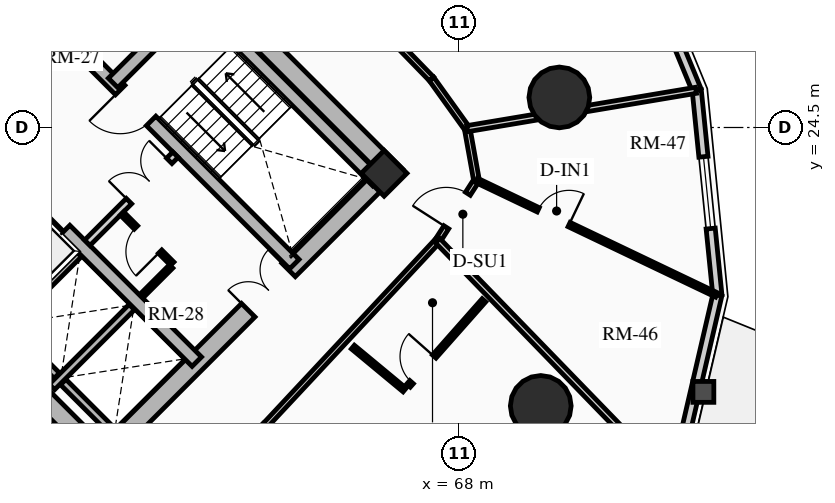
"""IFC4 building model, lengths in metres.
Left out: names, types, materials, properties, quantities, classifications, styles, units other than length and angle.
Written with IfcOpenShell. Run it as: python <this file> out.ifc"""

import sys

from ifc_helpers import new_model, si_unit, direction, frame, frame_2d, origin, origin_2d, place, context, subcontext, project, spatial, rectangle, circle, extrude, source, transform, mapped, element, fill, save


model = new_model("IFC4")
c1 = context("Model", 3, precision=1e-05, world=origin(), true_north=direction((0.0, 1.0)))
c2 = subcontext(c1, "Body", "Model", "MODEL_VIEW")
j1 = project(units=[si_unit("LENGTHUNIT", "METRE"), si_unit("PLANEANGLEUNIT", "RADIAN")], contexts=[c1])
p1 = place(None, origin())
s1 = spatial("IfcSite", under=j1, at=p1, CompositionType="ELEMENT")
p2 = place(p1, origin())
s2 = spatial("IfcBuilding", under=s1, at=p2, CompositionType="ELEMENT")
p3 = place(p2, frame((0.0, 0.0, 33.64)))
s3 = spatial("IfcBuildingStorey", under=s2, at=p3, CompositionType="ELEMENT", Elevation=33.64)
for number, where, z_axis, x_axis in (
    (1, (58.773, 15.661, 0.0), (0.0, 0.0, 1.0), (-0.707, 0.707, 0.0)),
    (2, (66.339, 23.227, 0.0), (0.0, 0.0, 1.0), (-0.707, 0.707, 0.0)),
):
    element("IfcWall", number, at=place(p3, frame(where, z_axis=z_axis, x_axis=x_axis)), inside=s3, PredefinedType="SHEAR", context=c2, shape_type="SweptSolid", body=[
        extrude(rectangle(XDim=14.3, YDim=0.5, at=frame_2d((7.15, 0.0))), origin(), (0.0, 0.0, 1.0), 2.91),
    ])
p4 = place(p3, frame((58.596, 15.838, 0.0), z_axis=(0.0, 0.0, 1.0), x_axis=(0.707106781187, 0.707106781187, 0.0)))
e3 = element("IfcWall", 3, at=p4, inside=s3, PredefinedType="SHEAR", context=c2, shape_type="SweptSolid", body=[
    extrude(rectangle(XDim=10.7, YDim=0.5, at=frame_2d((5.35, 0.0))), origin(), (0.0, 0.0, 1.0), 2.91),
])
m1 = source(origin(), c2, "Body", "SweptSolid", [
    extrude(rectangle(XDim=1.5, YDim=2.02, at=frame_2d((0.75, 1.01))), frame((0.0, 0.26, 0.0), z_axis=(0.0, -1.0, 0.0), x_axis=(1.0, 0.0, 0.0)), (0.0, 0.0, 1.0), 0.52),
])
p5 = place(p4, frame((5.45, 0.0, 0.0)))
e4 = element("IfcOpeningElement", 4, at=p5, cuts=e3, PredefinedType="OPENING", context=c2, shape_type="MappedRepresentation", body=[
    mapped(m1, transform((0.0, 0.0, 0.0), x_axis=(1.0, 0.0, 0.0), y_axis=(0.0, 1.0, 0.0), z_axis=(0.0, 0.0, 1.0), scale=1.0)),
])
p6 = place(p3, frame((61.096, 18.338, 0.0), z_axis=(0.0, 0.0, 1.0), x_axis=(-0.707106781187, 0.707106781187, 0.0)))
e5 = element("IfcWall", 5, at=p6, inside=s3, PredefinedType="SHEAR", context=c2, shape_type="SweptSolid", body=[
    extrude(rectangle(XDim=13.8, YDim=0.35, at=frame_2d((6.9, 0.0))), origin(), (0.0, 0.0, 1.0), 2.91),
])
m2 = source(origin(), c2, "Body", "SweptSolid", [
    extrude(rectangle(XDim=1.1, YDim=2.015, at=frame_2d((0.55, 1.007))), frame((0.0, 0.185, 0.0), z_axis=(0.0, -1.0, 0.0), x_axis=(1.0, 0.0, 0.0)), (0.0, 0.0, 1.0), 0.37),
])
p7 = place(p6, frame((4.9, 0.0, 0.0)))
e6 = element("IfcOpeningElement", 6, at=p7, cuts=e5, PredefinedType="OPENING", context=c2, shape_type="MappedRepresentation", body=[
    mapped(m2, transform((0.0, 0.0, 0.0), x_axis=(1.0, 0.0, 0.0), y_axis=(0.0, 1.0, 0.0), z_axis=(0.0, 0.0, 1.0), scale=1.0)),
])
m3 = source(origin(), c2, "Body", "SweptSolid", [
    extrude(rectangle(XDim=1.15, YDim=2.02, at=frame_2d((0.575, 1.01))), frame((0.0, 0.185, 0.0), z_axis=(0.0, -1.0, 0.0), x_axis=(1.0, 0.0, 0.0)), (0.0, 0.0, 1.0), 0.37),
])
p8 = place(p6, frame((7.32, 0.0, 0.0)))
e7 = element("IfcOpeningElement", 7, at=p8, cuts=e5, PredefinedType="OPENING", context=c2, shape_type="MappedRepresentation", body=[
    mapped(m3, transform((0.0, 0.0, 0.0), x_axis=(1.0, 0.0, 0.0), y_axis=(0.0, 1.0, 0.0), z_axis=(0.0, 0.0, 1.0), scale=1.0)),
])
p9 = place(p3, frame((63.662, 20.904, 0.0), z_axis=(0.0, 0.0, 1.0), x_axis=(-0.707106781187, 0.707106781187, 0.0)))
e8 = element("IfcWall", 8, at=p9, inside=s3, PredefinedType="SHEAR", context=c2, shape_type="SweptSolid", body=[
    extrude(rectangle(XDim=13.8, YDim=0.35, at=frame_2d((6.9, 0.0))), origin(), (0.0, 0.0, 1.0), 2.91),
])
p10 = place(p9, frame((10.025, 0.0, 0.0)))
e9 = element("IfcOpeningElement", 9, at=p10, cuts=e8, PredefinedType="OPENING", context=c2, shape_type="MappedRepresentation", body=[
    mapped(m2, transform((0.0, 0.0, 0.0), x_axis=(1.0, 0.0, 0.0), y_axis=(0.0, 1.0, 0.0), z_axis=(0.0, 0.0, 1.0), scale=1.0)),
])
p11 = place(p9, frame((12.025, 0.0, 0.0)))
e10 = element("IfcOpeningElement", 10, at=p11, cuts=e8, PredefinedType="OPENING", context=c2, shape_type="MappedRepresentation", body=[
    mapped(m2, transform((0.0, 0.0, 0.0), x_axis=(1.0, 0.0, 0.0), y_axis=(0.0, 1.0, 0.0), z_axis=(0.0, 0.0, 1.0), scale=1.0)),
])
p12 = place(p9, frame((5.33, 0.0, 0.0)))
e11 = element("IfcOpeningElement", 11, at=p12, cuts=e8, PredefinedType="OPENING", context=c2, shape_type="MappedRepresentation", body=[
    mapped(m3, transform((0.0, 0.0, 0.0), x_axis=(1.0, 0.0, 0.0), y_axis=(0.0, 1.0, 0.0), z_axis=(0.0, 0.0, 1.0), scale=1.0)),
])
p13 = place(p3, frame((65.847, 23.089, 0.0), z_axis=(0.0, 0.0, 1.0), x_axis=(-0.707106781187, 0.707106781187, 0.0)))
e12 = element("IfcWall", 12, at=p13, inside=s3, PredefinedType="SHEAR", context=c2, shape_type="SweptSolid", body=[
    extrude(rectangle(XDim=6.745, YDim=0.35, at=frame_2d((3.373, 0.0))), origin(), (0.0, 0.0, 1.0), 2.91),
])
p14 = place(p3, frame((58.893, 25.674, 0.0), z_axis=(0.0, 0.0, 1.0), x_axis=(0.707106781187, 0.707106781187, 0.0)))
e13 = element("IfcWall", 13, at=p14, inside=s3, PredefinedType="SHEAR", context=c2, shape_type="SweptSolid", body=[
    extrude(rectangle(XDim=3.285, YDim=0.35, at=frame_2d((1.643, 0.0))), origin(), (0.0, 0.0, 1.0), 2.91),
])
p15 = place(p3, frame((66.024, 23.294, 0.0), z_axis=(0.0, 0.0, 1.0), x_axis=(0.707106781187, 0.707106781187, 0.0)))
e14 = element("IfcColumn", 14, at=p15, inside=s3, PredefinedType="COLUMN", context=c2, shape_type="SweptSolid", body=[
    extrude(rectangle(XDim=0.85, YDim=0.85, at=origin_2d()), origin(), (0.0, 0.0, 1.0), 2.91),
])
for number, where, z_axis, x_axis in (
    (15, (70.146, 17.173, 0.0), (0.0, 0.0, 1.0), (1.0, 0.0, 0.0)),
    (16, (70.635, 25.291, 0.0), (0.0, 0.0, 1.0), (1.0, 0.0, 0.0)),
):
    element("IfcColumn", number, at=place(p3, frame(where, z_axis=z_axis, x_axis=x_axis)), inside=s3, PredefinedType="USERDEFINED", context=c2, shape_type="SweptSolid", body=[
        extrude(circle(Radius=0.8, at=origin_2d()), origin(), (0.0, 0.0, 1.0), 2.91),
    ])
p16 = place(p3, frame((74.794, 20.09, 0.0), z_axis=(0.0, 0.0, 1.0), x_axis=(-0.22582585901, -0.974167686491, 0.0)))
e17 = element("IfcWall", 17, at=p16, inside=s3, PredefinedType="SOLIDWALL", context=c2, shape_type="SweptSolid", body=[
    extrude(rectangle(XDim=5.092, YDim=0.24, at=frame_2d((2.546, 0.0))), origin(), (0.0, 0.0, 1.0), 2.073),
])
p17 = place(p3, frame((74.251, 25.482, 0.0), z_axis=(0.0, 0.0, 1.0), x_axis=(0.100190592135, -0.994968263437, 0.0)))
e18 = element("IfcWall", 18, at=p17, inside=s3, PredefinedType="SOLIDWALL", context=c2, shape_type="SweptSolid", body=[
    extrude(rectangle(XDim=5.419, YDim=0.24, at=frame_2d((2.71, 0.0))), origin(), (0.0, 0.0, 1.0), 2.073),
])
m4 = source(origin(), c2, "Body", "SweptSolid", [
    extrude(rectangle(XDim=1.9, YDim=1.35, at=frame_2d((0.95, 0.675))), frame((0.0, 0.13, 0.0), z_axis=(0.0, -1.0, 0.0), x_axis=(1.0, 0.0, 0.0)), (0.0, 0.0, 1.0), 0.26),
])
p18 = place(p17, frame((1.76, 0.0, 0.65)))
e19 = element("IfcOpeningElement", 19, at=p18, cuts=e18, PredefinedType="OPENING", context=c2, shape_type="MappedRepresentation", body=[
    mapped(m4, transform((0.0, 0.0, 0.0), x_axis=(1.0, 0.0, 0.0), y_axis=(0.0, 1.0, 0.0), z_axis=(0.0, 0.0, 1.0), scale=1.0)),
])
p19 = place(p3, frame((72.068, 30.778, 0.0), z_axis=(0.0, 0.0, 1.0), x_axis=(0.381077764176, -0.924542988536, 0.0)))
e20 = element("IfcWall", 20, at=p19, inside=s3, PredefinedType="SOLIDWALL", context=c2, shape_type="SweptSolid", body=[
    extrude(rectangle(XDim=5.728, YDim=0.24, at=frame_2d((2.864, 0.0))), origin(), (0.0, 0.0, 1.0), 2.073),
])
p20 = place(p3, frame((55.888, 19.069, 0.0), z_axis=(0.0, 0.0, 1.0), x_axis=(0.707106781187, 0.707106781187, 0.0)))
e21 = element("IfcWall", 21, at=p20, inside=s3, PredefinedType="SHEAR", context=c2, shape_type="SweptSolid", body=[
    extrude(rectangle(XDim=2.97, YDim=0.2, at=frame_2d((1.485, 0.0))), origin(), (0.0, 0.0, 1.0), 2.91),
])
p21 = place(p3, frame((57.284, 17.673, 0.0), z_axis=(0.0, 0.0, 1.0), x_axis=(0.707147878904, 0.70706568108, 0.0)))
e22 = element("IfcWall", 22, at=p21, inside=s3, PredefinedType="SHEAR", context=c2, shape_type="SweptSolid", body=[
    extrude(rectangle(XDim=2.97, YDim=0.2, at=frame_2d((1.485, 0.0))), origin(), (0.0, 0.0, 1.0), 2.91),
])
p22 = place(p3, frame((57.412, 17.97, 0.0), z_axis=(0.0, 0.0, 1.0), x_axis=(-0.707106781187, 0.707106781187, 0.0)))
e23 = element("IfcWall", 23, at=p22, inside=s3, PredefinedType="SHEAR", context=c2, shape_type="SweptSolid", body=[
    extrude(rectangle(XDim=1.735, YDim=0.2, at=frame_2d((0.867, 0.0))), origin(), (0.0, 0.0, 1.0), 2.91),
])
p23 = place(p3, frame((58.737, 16.644, 0.0), z_axis=(0.0, 0.0, 1.0), x_axis=(-0.707032117043, 0.707181437447, 0.0)))
e24 = element("IfcWall", 24, at=p23, inside=s3, PredefinedType="SHEAR", context=c2, shape_type="SweptSolid", body=[
    extrude(rectangle(XDim=1.635, YDim=0.2, at=frame_2d((0.817, 0.0))), origin(), (0.0, 0.0, 1.0), 2.91),
])
p24 = place(p3, frame((58.214, 21.467, 0.0), z_axis=(0.0, 0.0, 1.0), x_axis=(0.707106781187, 0.707106781187, 0.0)))
e25 = element("IfcWall", 25, at=p24, inside=s3, PredefinedType="PARTITIONING", context=c2, shape_type="SweptSolid", body=[
    extrude(rectangle(XDim=3.28, YDim=0.2, at=frame_2d((1.64, 0.0))), origin(), (0.0, 0.0, 1.0), 2.635),
])
m5 = source(origin(), c2, "Body", "SweptSolid", [
    extrude(rectangle(XDim=1.5, YDim=2.02, at=frame_2d((0.75, 1.01))), frame((0.0, 0.11, 0.0), z_axis=(0.0, -1.0, 0.0), x_axis=(1.0, 0.0, 0.0)), (0.0, 0.0, 1.0), 0.22),
])
p25 = place(p24, frame((1.55, 0.0, 0.0)))
e26 = element("IfcOpeningElement", 26, at=p25, cuts=e25, PredefinedType="OPENING", context=c2, shape_type="MappedRepresentation", body=[
    mapped(m5, transform((0.0, 0.0, 0.0), x_axis=(1.0, 0.0, 0.0), y_axis=(0.0, 1.0, 0.0), z_axis=(0.0, 0.0, 1.0), scale=1.0)),
])
p26 = place(p3, frame((54.961, 24.719, 0.0), z_axis=(0.0, 0.0, 1.0), x_axis=(0.707106781187, 0.707106781187, 0.0)))
e27 = element("IfcWall", 27, at=p26, inside=s3, PredefinedType="PARTITIONING", context=c2, shape_type="SweptSolid", body=[
    extrude(rectangle(XDim=3.28, YDim=0.2, at=frame_2d((1.64, 0.0))), origin(), (0.0, 0.0, 1.0), 2.635),
])
m6 = source(origin(), c2, "Body", "SweptSolid", [
    extrude(rectangle(XDim=0.9, YDim=2.005, at=frame_2d((0.45, 1.002))), frame((0.0, 0.11, 0.0), z_axis=(0.0, -1.0, 0.0), x_axis=(1.0, 0.0, 0.0)), (0.0, 0.0, 1.0), 0.22),
])
p27 = place(p26, frame((0.16, 0.0, 0.0)))
e28 = element("IfcOpeningElement", 28, at=p27, cuts=e27, PredefinedType="OPENING", context=c2, shape_type="MappedRepresentation", body=[
    mapped(m6, transform((0.0, 0.0, 0.0), x_axis=(1.0, 0.0, 0.0), y_axis=(0.0, 1.0, 0.0), z_axis=(0.0, 0.0, 1.0), scale=1.0)),
])
p28 = place(p3, frame((60.448, 20.915, 0.0), z_axis=(0.0, 0.0, 1.0), x_axis=(-0.707106781187, 0.707106781187, 0.0)))
e29 = element("IfcWall", 29, at=p28, inside=s3, PredefinedType="PARTITIONING", context=c2, shape_type="SweptSolid", body=[
    extrude(rectangle(XDim=1.87, YDim=0.125, at=frame_2d((0.935, 0.0))), origin(), (0.0, 0.0, 1.0), 2.635),
])
m7 = source(origin(), c2, "Body", "SweptSolid", [
    extrude(rectangle(XDim=0.9, YDim=2.005, at=frame_2d((0.45, 1.002))), frame((0.0, 0.073, 0.0), z_axis=(0.0, -1.0, 0.0), x_axis=(1.0, 0.0, 0.0)), (0.0, 0.0, 1.0), 0.145),
])
p29 = place(p28, frame((0.45, 0.0, 0.0)))
e30 = element("IfcOpeningElement", 30, at=p29, cuts=e29, PredefinedType="OPENING", context=c2, shape_type="MappedRepresentation", body=[
    mapped(m7, transform((0.0, 0.0, 0.0), x_axis=(1.0, 0.0, 0.0), y_axis=(0.0, 1.0, 0.0), z_axis=(0.0, 0.0, 1.0), scale=1.0)),
])
p30 = place(p3, frame((59.643, 20.066, 0.0), z_axis=(0.0, 0.0, 1.0), x_axis=(0.707106781187, 0.707106781187, 0.0)))
e31 = element("IfcWall", 31, at=p30, inside=s3, PredefinedType="PARTITIONING", context=c2, shape_type="SweptSolid", body=[
    extrude(rectangle(XDim=1.1, YDim=0.125, at=frame_2d((0.55, 0.0))), origin(), (0.0, 0.0, 1.0), 2.635),
])
p31 = place(p3, frame((62.903, 16.667, 0.0), z_axis=(0.0, 0.0, 1.0), x_axis=(0.682371947497, 0.731005147225, 0.0)))
e32 = element("IfcWall", 32, at=p31, inside=s3, PredefinedType="PARTITIONING", context=c2, shape_type="SweptSolid", body=[
    extrude(rectangle(XDim=6.642, YDim=0.15, at=frame_2d((3.321, 0.0))), origin(), (0.0, 0.0, 1.0), 2.159),
])
p32 = place(p3, frame((67.435, 21.521, 0.0), z_axis=(0.0, 0.0, 1.0), x_axis=(0.540777197838, 0.841165870859, 0.0)))
e33 = element("IfcWall", 33, at=p32, inside=s3, PredefinedType="PARTITIONING", context=c2, shape_type="SweptSolid", body=[
    extrude(rectangle(XDim=1.888, YDim=0.15, at=frame_2d((0.944, 0.0))), origin(), (0.0, 0.0, 1.0), 2.205),
])
m8 = source(origin(), c2, "Body", "SweptSolid", [
    extrude(rectangle(XDim=1.05, YDim=2.015, at=frame_2d((0.525, 1.007))), frame((0.0, 0.085, 0.0), z_axis=(0.0, -1.0, 0.0), x_axis=(1.0, 0.0, 0.0)), (0.0, 0.0, 1.0), 0.17),
])
p33 = place(p32, frame((0.419, 0.0, 0.0)))
e34 = element("IfcOpeningElement", 34, at=p33, cuts=e33, PredefinedType="OPENING", context=c2, shape_type="MappedRepresentation", body=[
    mapped(m8, transform((0.0, 0.0, 0.0), x_axis=(1.0, 0.0, 0.0), y_axis=(0.0, 1.0, 0.0), z_axis=(0.0, 0.0, 1.0), scale=1.0)),
])
p34 = place(p3, frame((68.456, 23.11, 0.0), z_axis=(0.0, 0.0, 1.0), x_axis=(-0.1772522795, 0.984165448191, 0.0)))
e35 = element("IfcWall", 35, at=p34, inside=s3, PredefinedType="PARTITIONING", context=c2, shape_type="SweptSolid", body=[
    extrude(rectangle(XDim=1.382, YDim=0.15, at=frame_2d((0.691, 0.0))), origin(), (0.0, 0.0, 1.0), 2.159),
])
p35 = place(p3, frame((68.211, 24.469, 0.0), z_axis=(0.0, 0.0, 1.0), x_axis=(-0.583012141368, 0.812463441034, 0.0)))
e36 = element("IfcWall", 36, at=p35, inside=s3, PredefinedType="PARTITIONING", context=c2, shape_type="SweptSolid", body=[
    extrude(rectangle(XDim=1.613, YDim=0.15, at=frame_2d((0.807, 0.0))), origin(), (0.0, 0.0, 1.0), 2.205),
])
p36 = place(p3, frame((67.27, 25.78, 0.0), z_axis=(0.0, 0.0, 1.0), x_axis=(-0.696847842907, 0.717218992942, 0.0)))
e37 = element("IfcWall", 37, at=p36, inside=s3, PredefinedType="PARTITIONING", context=c2, shape_type="SweptSolid", body=[
    extrude(rectangle(XDim=6.004, YDim=0.15, at=frame_2d((3.002, 0.0))), origin(), (0.0, 0.0, 1.0), 2.635),
])
m9 = source(origin(), c2, "Body", "SweptSolid", [
    extrude(rectangle(XDim=1.0, YDim=2.015, at=frame_2d((0.5, 1.007))), frame((0.0, 0.085, 0.0), z_axis=(0.0, -1.0, 0.0), x_axis=(1.0, 0.0, 0.0)), (0.0, 0.0, 1.0), 0.17),
])
p37 = place(p36, frame((2.502, 0.0, 0.0)))
e38 = element("IfcOpeningElement", 38, at=p37, cuts=e37, PredefinedType="OPENING", context=c2, shape_type="MappedRepresentation", body=[
    mapped(m9, transform((0.0, 0.0, 0.0), x_axis=(1.0, 0.0, 0.0), y_axis=(0.0, 1.0, 0.0), z_axis=(0.0, 0.0, 1.0), scale=1.0)),
])
p38 = place(p3, frame((67.435, 21.521, 0.0), z_axis=(0.0, 0.0, 1.0), x_axis=(0.6962628802, -0.717786877601, 0.0)))
e39 = element("IfcWall", 39, at=p38, inside=s3, PredefinedType="PARTITIONING", context=c2, shape_type="SweptSolid", body=[
    extrude(rectangle(XDim=8.893, YDim=0.16, at=frame_2d((4.446, 0.0))), origin(), (0.0, 0.0, 1.0), 2.073),
])
p39 = place(p3, frame((68.211, 24.469, 0.0), z_axis=(0.0, 0.0, 1.0), x_axis=(0.986231309699, 0.165371713934, 0.0)))
e40 = element("IfcWall", 40, at=p39, inside=s3, PredefinedType="PARTITIONING", context=c2, shape_type="SweptSolid", body=[
    extrude(rectangle(XDim=6.104, YDim=0.16, at=frame_2d((3.052, 0.0))), origin(), (0.0, 0.0, 1.0), 2.073),
])
p40 = place(p3, frame((65.202, 18.721, 0.0), z_axis=(0.0, 0.0, 1.0), x_axis=(0.769814202386, -0.638268042287, 0.0)))
e41 = element("IfcWall", 41, at=p40, inside=s3, PredefinedType="PARTITIONING", context=c2, shape_type="SweptSolid", body=[
    extrude(rectangle(XDim=1.769, YDim=0.125, at=frame_2d((0.884, 0.0))), origin(), (0.0, 0.0, 1.0), 2.635),
])
p41 = place(p3, frame((66.667, 17.709, 0.0), z_axis=(0.0, 0.0, 1.0), x_axis=(0.662510581678, 0.749052554341, 0.0)))
e42 = element("IfcWall", 42, at=p41, inside=s3, PredefinedType="PARTITIONING", context=c2, shape_type="SweptSolid", body=[
    extrude(rectangle(XDim=2.996, YDim=0.125, at=frame_2d((1.498, 0.0))), origin(), (0.0, 0.0, 1.0), 2.159),
])
p42 = place(p41, frame((0.12, 0.0, 0.0)))
e43 = element("IfcOpeningElement", 43, at=p42, cuts=e42, PredefinedType="OPENING", context=c2, shape_type="MappedRepresentation", body=[
    mapped(m7, transform((0.0, 0.0, 0.0), x_axis=(1.0, 0.0, 0.0), y_axis=(0.0, 1.0, 0.0), z_axis=(0.0, 0.0, 1.0), scale=1.0)),
])
p43 = place(p3, frame((68.456, 23.11, 0.0), z_axis=(0.0, 0.0, 1.0), x_axis=(0.902430819297, -0.430834790125, 0.0)))
e44 = element("IfcWall", 44, at=p43, inside=s3, PredefinedType="PARTITIONING", context=c2, shape_type="SweptSolid", body=[
    extrude(rectangle(XDim=7.002, YDim=0.125, at=frame_2d((3.501, 0.0))), origin(), (0.0, 0.0, 1.0), 2.073),
])
p44 = place(p43, frame((1.8, 0.0, 0.0)))
e45 = element("IfcOpeningElement", 45, at=p44, cuts=e44, PredefinedType="OPENING", context=c2, shape_type="MappedRepresentation", body=[
    mapped(m7, transform((0.0, 0.0, 0.0), x_axis=(1.0, 0.0, 0.0), y_axis=(0.0, 1.0, 0.0), z_axis=(0.0, 0.0, 1.0), scale=1.0)),
])
m10 = source(origin(), c2, "Body", "SweptSolid", [
    extrude(rectangle(XDim=1.9, YDim=1.35, at=frame_2d((0.95, 0.675))), frame((0.0, 0.03, 0.0), z_axis=(0.0, -1.0, 0.0), x_axis=(1.0, 0.0, 0.0)), (0.0, 0.0, 1.0), 0.06),
])
p45 = place(p18, origin())
e46 = element("IfcWindow", 46, at=p45, inside=s3, PartitioningType="DOUBLE_PANEL_VERTICAL", PredefinedType="WINDOW", context=c2, shape_type="MappedRepresentation", body=[
    mapped(m10, transform((0.0, 0.0, 0.0), x_axis=(1.0, 0.0, 0.0), y_axis=(0.0, 1.0, 0.0), z_axis=(0.0, 0.0, 1.0), scale=1.0)),
])
fill(e19, e46)
m11 = source(origin(), c2, "Body", "SweptSolid", [
    extrude(rectangle(XDim=1.1, YDim=2.015, at=frame_2d((0.55, 1.007))), frame((0.0, 0.025, 0.0), z_axis=(0.0, -1.0, 0.0), x_axis=(1.0, 0.0, 0.0)), (0.0, 0.0, 1.0), 0.05),
])
p46 = place(p7, origin())
e47 = element("IfcDoor", 47, at=p46, inside=s3, OperationType="SLIDING_TO_LEFT", PredefinedType="DOOR", context=c2, shape_type="MappedRepresentation", body=[
    mapped(m11, transform((0.0, 0.0, 0.0), x_axis=(1.0, 0.0, 0.0), y_axis=(0.0, 1.0, 0.0), z_axis=(0.0, 0.0, 1.0), scale=1.0)),
])
fill(e6, e47)
m12 = source(origin(), c2, "Body", "SweptSolid", [
    extrude(rectangle(XDim=1.15, YDim=2.02, at=frame_2d((0.575, 1.01))), frame((0.0, 0.025, 0.0), z_axis=(0.0, -1.0, 0.0), x_axis=(1.0, 0.0, 0.0)), (0.0, 0.0, 1.0), 0.05),
])
p47 = place(p12, origin())
e48 = element("IfcDoor", 48, at=p47, inside=s3, OperationType="SINGLE_SWING_RIGHT", PredefinedType="DOOR", context=c2, shape_type="MappedRepresentation", body=[
    mapped(m12, transform((0.0, 0.0, 0.0), x_axis=(1.0, 0.0, 0.0), y_axis=(0.0, 1.0, 0.0), z_axis=(0.0, 0.0, 1.0), scale=1.0)),
])
fill(e11, e48)
m13 = source(origin(), c2, "Body", "SweptSolid", [
    extrude(rectangle(XDim=1.5, YDim=2.02, at=frame_2d((0.75, 1.01))), frame((0.0, 0.025, 0.0), z_axis=(0.0, -1.0, 0.0), x_axis=(1.0, 0.0, 0.0)), (0.0, 0.0, 1.0), 0.05),
])
p48 = place(p5, origin())
e49 = element("IfcDoor", 49, at=p48, inside=s3, OperationType="DOUBLE_DOOR_SINGLE_SWING", PredefinedType="DOOR", context=c2, shape_type="MappedRepresentation", body=[
    mapped(m13, transform((0.0, 0.0, 0.0), x_axis=(1.0, 0.0, 0.0), y_axis=(0.0, 1.0, 0.0), z_axis=(0.0, 0.0, 1.0), scale=1.0)),
])
fill(e4, e49)
p49 = place(p25, origin())
e50 = element("IfcDoor", 50, at=p49, inside=s3, OperationType="DOUBLE_DOOR_SINGLE_SWING", PredefinedType="DOOR", context=c2, shape_type="MappedRepresentation", body=[
    mapped(m13, transform((0.0, 0.0, 0.0), x_axis=(1.0, 0.0, 0.0), y_axis=(0.0, 1.0, 0.0), z_axis=(0.0, 0.0, 1.0), scale=1.0)),
])
fill(e26, e50)
m14 = source(origin(), c2, "Body", "SweptSolid", [
    extrude(rectangle(XDim=0.9, YDim=2.005, at=frame_2d((0.45, 1.002))), frame((0.0, 0.025, 0.0), z_axis=(0.0, -1.0, 0.0), x_axis=(1.0, 0.0, 0.0)), (0.0, 0.0, 1.0), 0.05),
])
p50 = place(p29, origin())
e51 = element("IfcDoor", 51, at=p50, inside=s3, OperationType="SINGLE_SWING_LEFT", PredefinedType="DOOR", context=c2, shape_type="MappedRepresentation", body=[
    mapped(m14, transform((0.0, 0.0, 0.0), x_axis=(1.0, 0.0, 0.0), y_axis=(0.0, 1.0, 0.0), z_axis=(0.0, 0.0, 1.0), scale=1.0)),
])
fill(e30, e51)
p51 = place(p42, origin())
e52 = element("IfcDoor", 52, at=p51, inside=s3, OperationType="SINGLE_SWING_RIGHT", PredefinedType="DOOR", context=c2, shape_type="MappedRepresentation", body=[
    mapped(m14, transform((0.0, 0.0, 0.0), x_axis=(1.0, 0.0, 0.0), y_axis=(0.0, 1.0, 0.0), z_axis=(0.0, 0.0, 1.0), scale=1.0)),
])
fill(e43, e52)
m15 = source(origin(), c2, "Body", "SweptSolid", [
    extrude(rectangle(XDim=1.05, YDim=2.015, at=frame_2d((0.525, 1.007))), frame((0.0, 0.025, 0.0), z_axis=(0.0, -1.0, 0.0), x_axis=(1.0, 0.0, 0.0)), (0.0, 0.0, 1.0), 0.05),
])
p52 = place(p33, origin())
e53 = element("IfcDoor", 53, at=p52, inside=s3, OperationType="SINGLE_SWING_LEFT", PredefinedType="DOOR", context=c2, shape_type="MappedRepresentation", body=[
    mapped(m15, transform((0.0, 0.0, 0.0), x_axis=(1.0, 0.0, 0.0), y_axis=(0.0, 1.0, 0.0), z_axis=(0.0, 0.0, 1.0), scale=1.0)),
])
fill(e34, e53)
p53 = place(p44, origin())
e54 = element("IfcDoor", 54, at=p53, inside=s3, OperationType="SINGLE_SWING_RIGHT", PredefinedType="DOOR", context=c2, shape_type="MappedRepresentation", body=[
    mapped(m14, transform((0.0, 0.0, 0.0), x_axis=(1.0, 0.0, 0.0), y_axis=(0.0, 1.0, 0.0), z_axis=(0.0, 0.0, 1.0), scale=1.0)),
])
fill(e45, e54)
save(model, sys.argv[1])
